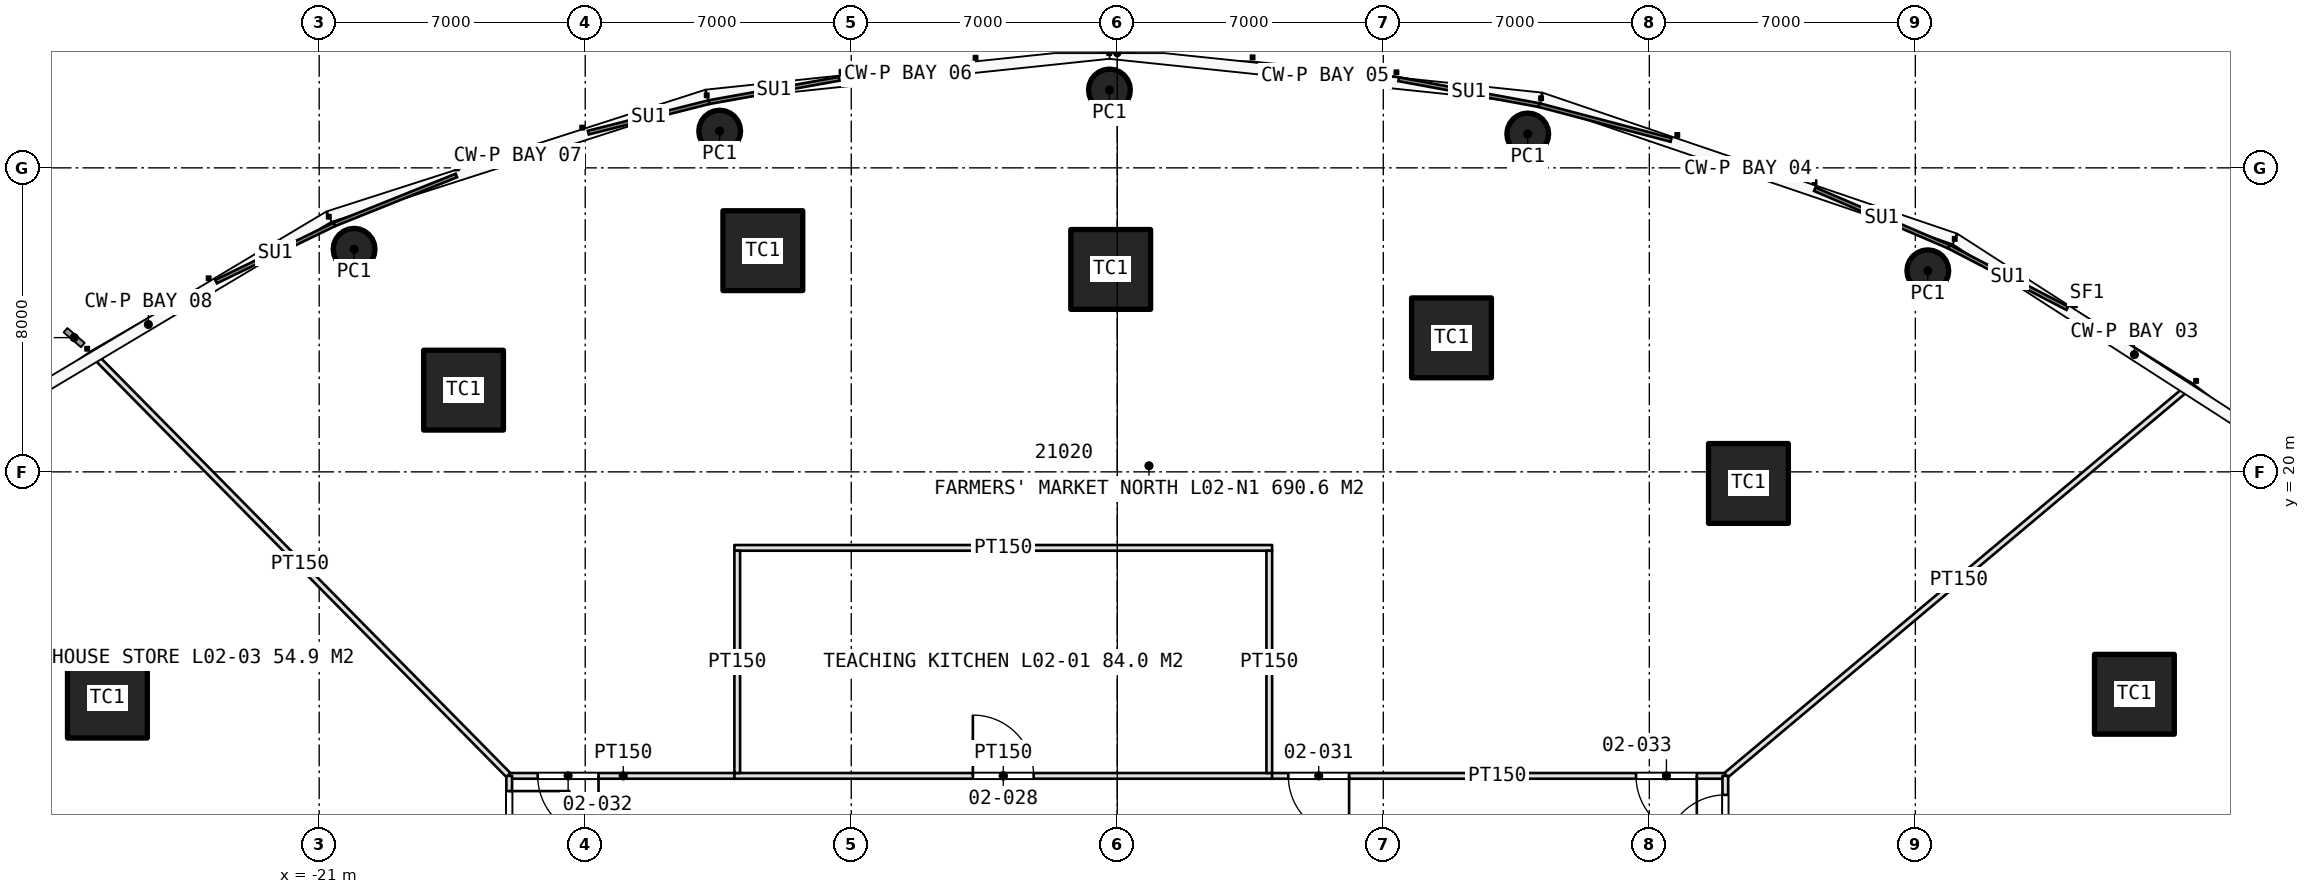
"""IFC4 building model, lengths in metres.
Left out: names, types, materials, properties, quantities, classifications, styles, units other than length and angle.
Written with IfcOpenShell. Run it as: python <this file> out.ifc"""

import sys

from ifc_helpers import new_model, si_unit, direction, frame, frame_2d, origin, origin_2d, place, context, subcontext, project, spatial, rectangle, circle, extrude, element, fill, save


model = new_model("IFC4")
c1 = context("Model", 3, precision=1e-05, world=origin(), true_north=direction((0.0, 1.0)))
c2 = subcontext(c1, "Body", "Model", "MODEL_VIEW")
j1 = project(units=[si_unit("LENGTHUNIT", "METRE"), si_unit("PLANEANGLEUNIT", "RADIAN")], contexts=[c1])
p1 = place(None, origin())
s1 = spatial("IfcSite", under=j1, at=p1, CompositionType="ELEMENT")
p2 = place(p1, origin())
s2 = spatial("IfcBuilding", under=s1, at=p2, CompositionType="ELEMENT")
p3 = place(p2, frame((0.0, 0.0, 10.0)))
s3 = spatial("IfcBuildingStorey", under=s2, at=p3, CompositionType="ELEMENT", Elevation=10.0)
for number, where, z_axis, x_axis in (
    (1, (26.764, 14.147, 0.0), (0.0, 0.0, 1.0), (1.0, 0.0, 0.0)),
    (2, (16.608, 19.695, 0.0), (0.0, 0.0, 1.0), (1.0, 0.0, 0.0)),
    (3, (8.795, 23.527, 0.0), (0.0, 0.0, 1.0), (1.0, 0.0, 0.0)),
    (4, (-0.173, 25.327, 0.0), (0.0, 0.0, 1.0), (1.0, 0.0, 0.0)),
    (5, (-9.326, 25.821, 0.0), (0.0, 0.0, 1.0), (1.0, 0.0, 0.0)),
    (6, (-17.202, 22.15, 0.0), (0.0, 0.0, 1.0), (1.0, 0.0, 0.0)),
    (7, (-26.573, 14.046, 0.0), (0.0, 0.0, 1.0), (1.0, 0.0, 0.0)),
):
    element("IfcColumn", number, at=place(p3, frame(where, z_axis=z_axis, x_axis=x_axis)), inside=s3, PredefinedType="COLUMN", context=c2, shape_type="SweptSolid", body=[
        extrude(rectangle(XDim=2.1, YDim=2.1, at=origin_2d()), origin(), (0.0, 0.0, 1.0), 5.0),
    ])
for number, where, z_axis, x_axis in (
    (8, (21.328, 25.292, 0.0), (0.0, 0.0, 1.0), (1.0, 0.0, 0.0)),
    (9, (10.801, 28.892, 0.0), (0.0, 0.0, 1.0), (1.0, 0.0, 0.0)),
    (10, (-0.206, 30.049, 0.0), (0.0, 0.0, 1.0), (1.0, 0.0, 0.0)),
    (11, (-10.462, 28.967, 0.0), (0.0, 0.0, 1.0), (1.0, 0.0, 0.0)),
    (12, (-20.082, 25.858, 0.0), (0.0, 0.0, 1.0), (1.0, 0.0, 0.0)),
):
    element("IfcColumn", number, at=place(p3, frame(where, z_axis=z_axis, x_axis=x_axis)), inside=s3, PredefinedType="COLUMN", context=c2, shape_type="SweptSolid", body=[
        extrude(circle(Radius=0.55, at=origin_2d()), origin(), (0.0, 0.0, 1.0), 5.0),
    ])
p4 = place(p3, frame((-16.014, 12.014, 0.0), z_axis=(0.0, 0.0, 1.0), x_axis=(-0.702408551969, 0.711773999329, 0.0)))
e13 = element("IfcWall", 13, at=p4, inside=s3, PredefinedType="PARTITIONING", context=c2, shape_type="SweptSolid", body=[
    extrude(rectangle(XDim=15.641, YDim=0.15, at=frame_2d((7.82, 0.0))), origin(), (0.0, 0.0, 1.0), 3.8),
])
p5 = place(p3, frame((16.015, 12.013, 0.0), z_axis=(0.0, 0.0, 1.0), x_axis=(0.765915114931, 0.642941705538, 0.0)))
e14 = element("IfcWall", 14, at=p5, inside=s3, PredefinedType="PARTITIONING", context=c2, shape_type="SweptSolid", body=[
    extrude(rectangle(XDim=16.01, YDim=0.15, at=frame_2d((8.005, 0.0))), origin(), (0.0, 0.0, 1.0), 3.8),
])
p6 = place(p3, frame((-10.0, 12.0, 0.0), z_axis=(0.0, 0.0, 1.0), x_axis=(-1.0, 0.0, 0.0)))
e15 = element("IfcWall", 15, at=p6, inside=s3, PredefinedType="PARTITIONING", context=c2, shape_type="SweptSolid", body=[
    extrude(rectangle(XDim=6.0, YDim=0.15, at=frame_2d((3.0, 0.0))), origin(), (0.0, 0.0, 1.0), 3.8),
])
p7 = place(p6, frame((3.65, 0.0, 0.0)))
e16 = element("IfcOpeningElement", 16, at=p7, cuts=e15, PredefinedType="OPENING", context=c2, shape_type="SweptSolid", body=[
    extrude(rectangle(XDim=1.6, YDim=2.4, at=frame_2d((0.8, 1.2))), frame((0.0, 0.085, 0.0), z_axis=(0.0, -1.0, 0.0), x_axis=(1.0, 0.0, 0.0)), (0.0, 0.0, 1.0), 0.17),
])
p8 = place(p3, frame((16.0, 12.0, 0.0), z_axis=(0.0, 0.0, 1.0), x_axis=(-1.0, 0.0, 0.0)))
e17 = element("IfcWall", 17, at=p8, inside=s3, PredefinedType="PARTITIONING", context=c2, shape_type="SweptSolid", body=[
    extrude(rectangle(XDim=12.0, YDim=0.15, at=frame_2d((6.0, 0.0))), origin(), (0.0, 0.0, 1.0), 3.8),
])
p9 = place(p8, frame((9.9, 0.0, 0.0)))
e18 = element("IfcOpeningElement", 18, at=p9, cuts=e17, PredefinedType="OPENING", context=c2, shape_type="SweptSolid", body=[
    extrude(rectangle(XDim=1.6, YDim=2.4, at=frame_2d((0.8, 1.2))), frame((0.0, 0.085, 0.0), z_axis=(0.0, -1.0, 0.0), x_axis=(1.0, 0.0, 0.0)), (0.0, 0.0, 1.0), 0.17),
])
p10 = place(p8, frame((0.75, 0.0, 0.0)))
e19 = element("IfcOpeningElement", 19, at=p10, cuts=e17, PredefinedType="OPENING", context=c2, shape_type="SweptSolid", body=[
    extrude(rectangle(XDim=1.6, YDim=2.4, at=frame_2d((0.8, 1.2))), frame((0.0, 0.085, 0.0), z_axis=(0.0, -1.0, 0.0), x_axis=(1.0, 0.0, 0.0)), (0.0, 0.0, 1.0), 0.17),
])
p11 = place(p3, frame((16.0, -12.0, 0.0), z_axis=(0.0, 0.0, 1.0), x_axis=(0.0, 1.0, 0.0)))
e20 = element("IfcWall", 20, at=p11, inside=s3, PredefinedType="PARTITIONING", context=c2, shape_type="SweptSolid", body=[
    extrude(rectangle(XDim=24.0, YDim=0.15, at=frame_2d((12.0, 0.0))), origin(), (0.0, 0.0, 1.0), 3.8),
])
p12 = place(p11, frame((10.4, 0.0, 0.0)))
e21 = element("IfcOpeningElement", 21, at=p12, cuts=e20, PredefinedType="OPENING", context=c2, shape_type="SweptSolid", body=[
    extrude(rectangle(XDim=1.6, YDim=2.4, at=frame_2d((0.8, 1.2))), frame((0.0, 0.085, 0.0), z_axis=(0.0, -1.0, 0.0), x_axis=(1.0, 0.0, 0.0)), (0.0, 0.0, 1.0), 0.17),
])
p13 = place(p11, frame((21.9, 0.0, 0.0)))
e22 = element("IfcOpeningElement", 22, at=p13, cuts=e20, PredefinedType="OPENING", context=c2, shape_type="SweptSolid", body=[
    extrude(rectangle(XDim=1.6, YDim=2.4, at=frame_2d((0.8, 1.2))), frame((0.0, 0.085, 0.0), z_axis=(0.0, -1.0, 0.0), x_axis=(1.0, 0.0, 0.0)), (0.0, 0.0, 1.0), 0.17),
])
p14 = place(p11, frame((0.4, 0.0, 0.0)))
e23 = element("IfcOpeningElement", 23, at=p14, cuts=e20, PredefinedType="OPENING", context=c2, shape_type="SweptSolid", body=[
    extrude(rectangle(XDim=1.6, YDim=2.4, at=frame_2d((0.8, 1.2))), frame((0.0, 0.085, 0.0), z_axis=(0.0, -1.0, 0.0), x_axis=(1.0, 0.0, 0.0)), (0.0, 0.0, 1.0), 0.17),
])
p15 = place(p3, frame((-16.0, 12.0, 0.0), z_axis=(0.0, 0.0, 1.0), x_axis=(0.0, -1.0, 0.0)))
e24 = element("IfcWall", 24, at=p15, inside=s3, PredefinedType="PARTITIONING", context=c2, shape_type="SweptSolid", body=[
    extrude(rectangle(XDim=24.0, YDim=0.15, at=frame_2d((12.0, 0.0))), origin(), (0.0, 0.0, 1.0), 3.8),
])
p16 = place(p15, frame((12.9, 0.0, 0.0)))
e25 = element("IfcOpeningElement", 25, at=p16, cuts=e24, PredefinedType="OPENING", context=c2, shape_type="SweptSolid", body=[
    extrude(rectangle(XDim=1.6, YDim=2.4, at=frame_2d((0.8, 1.2))), frame((0.0, 0.085, 0.0), z_axis=(0.0, -1.0, 0.0), x_axis=(1.0, 0.0, 0.0)), (0.0, 0.0, 1.0), 0.17),
])
p17 = place(p15, frame((0.4, 0.0, 0.0)))
e26 = element("IfcOpeningElement", 26, at=p17, cuts=e24, PredefinedType="OPENING", context=c2, shape_type="SweptSolid", body=[
    extrude(rectangle(XDim=1.6, YDim=2.4, at=frame_2d((0.8, 1.2))), frame((0.0, 0.085, 0.0), z_axis=(0.0, -1.0, 0.0), x_axis=(1.0, 0.0, 0.0)), (0.0, 0.0, 1.0), 0.17),
])
p18 = place(p15, frame((21.9, 0.0, 0.0)))
e27 = element("IfcOpeningElement", 27, at=p18, cuts=e24, PredefinedType="OPENING", context=c2, shape_type="SweptSolid", body=[
    extrude(rectangle(XDim=1.6, YDim=2.4, at=frame_2d((0.8, 1.2))), frame((0.0, 0.085, 0.0), z_axis=(0.0, -1.0, 0.0), x_axis=(1.0, 0.0, 0.0)), (0.0, 0.0, 1.0), 0.17),
])
p19 = place(p3, frame((-10.075, 12.0, 0.0), z_axis=(0.0, 0.0, 1.0), x_axis=(1.0, 0.0, 0.0)))
e28 = element("IfcWall", 28, at=p19, inside=s3, PredefinedType="PARTITIONING", context=c2, shape_type="SweptSolid", body=[
    extrude(rectangle(XDim=14.15, YDim=0.15, at=frame_2d((7.075, 0.0))), origin(), (0.0, 0.0, 1.0), 3.8),
])
p20 = place(p19, frame((6.275, 0.0, 0.0)))
e29 = element("IfcOpeningElement", 29, at=p20, cuts=e28, PredefinedType="OPENING", context=c2, shape_type="SweptSolid", body=[
    extrude(rectangle(XDim=1.6, YDim=2.4, at=frame_2d((0.8, 1.2))), frame((0.0, 0.085, 0.0), z_axis=(0.0, -1.0, 0.0), x_axis=(1.0, 0.0, 0.0)), (0.0, 0.0, 1.0), 0.17),
])
p21 = place(p3, frame((-10.075, 18.0, 0.0), z_axis=(0.0, 0.0, 1.0), x_axis=(1.0, 0.0, 0.0)))
e30 = element("IfcWall", 30, at=p21, inside=s3, PredefinedType="PARTITIONING", context=c2, shape_type="SweptSolid", body=[
    extrude(rectangle(XDim=14.15, YDim=0.15, at=frame_2d((7.075, 0.0))), origin(), (0.0, 0.0, 1.0), 3.8),
])
for number, where, z_axis, x_axis in (
    (31, (-10.0, 12.075, 0.0), (0.0, 0.0, 1.0), (0.0, 1.0, 0.0)),
    (32, (4.0, 12.075, 0.0), (0.0, 0.0, 1.0), (0.0, 1.0, 0.0)),
):
    element("IfcWall", number, at=place(p3, frame(where, z_axis=z_axis, x_axis=x_axis)), inside=s3, PredefinedType="PARTITIONING", context=c2, shape_type="SweptSolid", body=[
        extrude(rectangle(XDim=5.85, YDim=0.15, at=frame_2d((2.925, 0.0))), origin(), (0.0, 0.0, 1.0), 3.8),
    ])
p22 = place(p20, origin())
e33 = element("IfcDoor", 33, at=p22, inside=s3, OperationType="DOUBLE_DOOR_SINGLE_SWING", PredefinedType="DOOR", context=c2, shape_type="SweptSolid", body=[
    extrude(rectangle(XDim=1.6, YDim=2.4, at=frame_2d((0.8, 1.2))), frame((0.0, 0.025, 0.0), z_axis=(0.0, -1.0, 0.0), x_axis=(1.0, 0.0, 0.0)), (0.0, 0.0, 1.0), 0.05),
])
fill(e29, e33)
p23 = place(p9, origin())
e34 = element("IfcDoor", 34, at=p23, inside=s3, OperationType="DOUBLE_DOOR_SINGLE_SWING", PredefinedType="DOOR", context=c2, shape_type="SweptSolid", body=[
    extrude(rectangle(XDim=1.6, YDim=2.4, at=frame_2d((0.8, 1.2))), frame((0.0, 0.025, 0.0), z_axis=(0.0, -1.0, 0.0), x_axis=(1.0, 0.0, 0.0)), (0.0, 0.0, 1.0), 0.05),
])
fill(e18, e34)
p24 = place(p7, origin())
e35 = element("IfcDoor", 35, at=p24, inside=s3, OperationType="DOUBLE_DOOR_SINGLE_SWING", PredefinedType="DOOR", context=c2, shape_type="SweptSolid", body=[
    extrude(rectangle(XDim=1.6, YDim=2.4, at=frame_2d((0.8, 1.2))), frame((0.0, 0.025, 0.0), z_axis=(0.0, -1.0, 0.0), x_axis=(1.0, 0.0, 0.0)), (0.0, 0.0, 1.0), 0.05),
])
fill(e16, e35)
p25 = place(p10, origin())
e36 = element("IfcDoor", 36, at=p25, inside=s3, OperationType="DOUBLE_DOOR_SINGLE_SWING", PredefinedType="DOOR", context=c2, shape_type="SweptSolid", body=[
    extrude(rectangle(XDim=1.6, YDim=2.4, at=frame_2d((0.8, 1.2))), frame((0.0, 0.025, 0.0), z_axis=(0.0, -1.0, 0.0), x_axis=(1.0, 0.0, 0.0)), (0.0, 0.0, 1.0), 0.05),
])
fill(e19, e36)
p26 = place(p13, origin())
e37 = element("IfcDoor", 37, at=p26, inside=s3, OperationType="DOUBLE_DOOR_SINGLE_SWING", PredefinedType="DOOR", context=c2, shape_type="SweptSolid", body=[
    extrude(rectangle(XDim=1.6, YDim=2.4, at=frame_2d((0.8, 1.2))), frame((0.0, 0.025, 0.0), z_axis=(0.0, -1.0, 0.0), x_axis=(1.0, 0.0, 0.0)), (0.0, 0.0, 1.0), 0.05),
])
fill(e22, e37)
p27 = place(p17, origin())
e38 = element("IfcDoor", 38, at=p27, inside=s3, OperationType="DOUBLE_DOOR_SINGLE_SWING", PredefinedType="DOOR", context=c2, shape_type="SweptSolid", body=[
    extrude(rectangle(XDim=1.6, YDim=2.4, at=frame_2d((0.8, 1.2))), frame((0.0, 0.025, 0.0), z_axis=(0.0, -1.0, 0.0), x_axis=(1.0, 0.0, 0.0)), (0.0, 0.0, 1.0), 0.05),
])
fill(e26, e38)
save(model, sys.argv[1])
